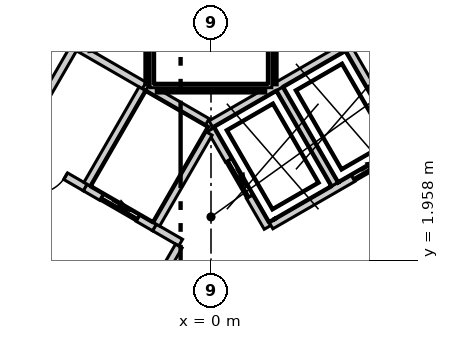
"""IFC4 building model, lengths in metres.
Left out: names, types, materials, properties, quantities, classifications, styles, units other than length and angle.
Written with IfcOpenShell. Run it as: python <this file> out.ifc"""

import sys

from ifc_helpers import new_model, si_unit, direction, frame, frame_2d, origin, place, context, subcontext, project, spatial, polyline, rectangle, outline, extrude, element, fill, save


model = new_model("IFC4")
c1 = context("Model", 3, precision=1e-05, world=origin(), true_north=direction((0.0, 1.0)))
c2 = subcontext(c1, "Body", "Model", "MODEL_VIEW")
j1 = project(units=[si_unit("LENGTHUNIT", "METRE"), si_unit("PLANEANGLEUNIT", "RADIAN")], contexts=[c1])
p1 = place(None, origin())
s1 = spatial("IfcSite", under=j1, at=p1, CompositionType="ELEMENT")
p2 = place(p1, origin())
s2 = spatial("IfcBuilding", under=s1, at=p2, CompositionType="ELEMENT")
p3 = place(p2, frame((0.0, 0.0, 47.3)))
s3 = spatial("IfcBuildingStorey", under=s2, at=p3, CompositionType="ELEMENT", Elevation=47.3)
p4 = place(p3, frame((-1.645, 15.25, -0.3), z_axis=(0.0, 0.0, 1.0), x_axis=(-0.500026485275, -0.866010111964, 0.0)))
e1 = element("IfcWall", 1, at=p4, inside=s3, PredefinedType="SHEAR", context=c2, shape_type="SweptSolid", body=[
    extrude(outline(polyline([(-0.26, -0.45), (1.685, -0.45), (3.63, -0.45), (5.576, -0.45), (7.521, -0.45), (9.466, -0.449), (11.411, -0.449), (13.357, -0.449), (15.302, -0.449), (17.247, -0.449), (19.192, -0.449), (21.138, -0.449), (23.083, -0.449), (25.028, -0.449), (24.509, 0.45), (22.644, 0.45), (20.778, 0.45), (18.913, 0.45), (17.048, 0.45), (15.182, 0.449), (13.317, 0.449), (11.452, 0.449), (9.587, 0.449), (7.721, 0.449), (5.856, 0.449), (3.991, 0.449), (2.125, 0.449), (0.26, 0.449), (-0.26, -0.45)])), origin(), (0.0, 0.0, 1.0), 4.0),
])
p5 = place(p4, frame((11.834, 0.0, 0.3)))
e2 = element("IfcOpeningElement", 2, at=p5, cuts=e1, PredefinedType="OPENING", context=c2, shape_type="SweptSolid", body=[
    extrude(rectangle(XDim=1.1, YDim=2.1, at=frame_2d((0.55, 1.05))), frame((0.0, 0.46, 0.0), z_axis=(0.0, -1.0, 0.0), x_axis=(1.0, 0.0, 0.0)), (0.0, 0.0, 1.0), 0.92),
])
p6 = place(p4, frame((6.671, 0.0, 0.3)))
e3 = element("IfcOpeningElement", 3, at=p6, cuts=e1, PredefinedType="OPENING", context=c2, shape_type="SweptSolid", body=[
    extrude(rectangle(XDim=1.0, YDim=2.1, at=frame_2d((0.5, 1.05))), frame((0.0, 0.46, 0.0), z_axis=(0.0, -1.0, 0.0), x_axis=(1.0, 0.0, 0.0)), (0.0, 0.0, 1.0), 0.92),
])
p7 = place(p3, frame((14.03, -6.2, -0.3), z_axis=(0.0, 0.0, 1.0), x_axis=(-0.500026485275, 0.866010111964, 0.0)))
e4 = element("IfcWall", 4, at=p7, inside=s3, PredefinedType="SHEAR", context=c2, shape_type="SweptSolid", body=[
    extrude(outline(polyline([(-0.26, -0.449), (1.685, -0.449), (3.63, -0.449), (5.576, -0.449), (7.521, -0.449), (9.466, -0.449), (11.411, -0.449), (13.357, -0.449), (15.302, -0.449), (17.247, -0.45), (19.192, -0.45), (21.138, -0.45), (23.083, -0.45), (25.028, -0.45), (24.509, 0.449), (22.644, 0.449), (20.778, 0.449), (18.913, 0.449), (17.048, 0.449), (15.182, 0.449), (13.317, 0.449), (11.452, 0.449), (9.587, 0.449), (7.721, 0.45), (5.856, 0.45), (3.991, 0.45), (2.125, 0.45), (0.26, 0.45), (-0.26, -0.449)])), origin(), (0.0, 0.0, 1.0), 4.0),
])
p8 = place(p7, frame((11.484, 0.0, 0.3)))
e5 = element("IfcOpeningElement", 5, at=p8, cuts=e4, PredefinedType="OPENING", context=c2, shape_type="SweptSolid", body=[
    extrude(rectangle(XDim=1.8, YDim=2.1, at=frame_2d((0.9, 1.05))), frame((0.0, 0.46, 0.0), z_axis=(0.0, -1.0, 0.0), x_axis=(1.0, 0.0, 0.0)), (0.0, 0.0, 1.0), 0.92),
])
p9 = place(p7, frame((18.976, 0.0, 0.3)))
e6 = element("IfcOpeningElement", 6, at=p9, cuts=e4, PredefinedType="OPENING", context=c2, shape_type="SweptSolid", body=[
    extrude(rectangle(XDim=0.9, YDim=2.1, at=frame_2d((0.45, 1.05))), frame((0.0, 0.46, 0.0), z_axis=(0.0, -1.0, 0.0), x_axis=(1.0, 0.0, 0.0)), (0.0, 0.0, 1.0), 0.92),
])
p10 = place(p3, frame((-3.417, 38.096, 0.0), z_axis=(0.0, 0.0, 1.0), x_axis=(-0.500000412988, -0.866025165346, 0.0)))
e7 = element("IfcWall", 7, at=p10, inside=s3, PredefinedType="ELEMENTEDWALL", context=c2, shape_type="SweptSolid", body=[
    extrude(rectangle(XDim=62.548, YDim=0.2, at=frame_2d((31.274, 0.0))), origin(), (0.0, 0.0, 1.0), 3.7),
])
p11 = place(p10, frame((2.25, 0.0, 0.9)))
e8 = element("IfcOpeningElement", 8, at=p11, cuts=e7, PredefinedType="OPENING", context=c2, shape_type="SweptSolid", body=[
    extrude(rectangle(XDim=5.6, YDim=2.5, at=frame_2d((2.8, 1.25))), frame((0.0, 0.11, 0.0), z_axis=(0.0, -1.0, 0.0), x_axis=(1.0, 0.0, 0.0)), (0.0, 0.0, 1.0), 0.22),
])
p12 = place(p10, frame((9.745, 0.0, 0.9)))
e9 = element("IfcOpeningElement", 9, at=p12, cuts=e7, PredefinedType="OPENING", context=c2, shape_type="SweptSolid", body=[
    extrude(rectangle(XDim=5.6, YDim=2.5, at=frame_2d((2.8, 1.25))), frame((0.0, 0.11, 0.0), z_axis=(0.0, -1.0, 0.0), x_axis=(1.0, 0.0, 0.0)), (0.0, 0.0, 1.0), 0.22),
])
p13 = place(p10, frame((17.241, 0.0, 0.9)))
e10 = element("IfcOpeningElement", 10, at=p13, cuts=e7, PredefinedType="OPENING", context=c2, shape_type="SweptSolid", body=[
    extrude(rectangle(XDim=5.6, YDim=2.5, at=frame_2d((2.8, 1.25))), frame((0.0, 0.11, 0.0), z_axis=(0.0, -1.0, 0.0), x_axis=(1.0, 0.0, 0.0)), (0.0, 0.0, 1.0), 0.22),
])
p14 = place(p10, frame((24.736, 0.0, 0.9)))
e11 = element("IfcOpeningElement", 11, at=p14, cuts=e7, PredefinedType="OPENING", context=c2, shape_type="SweptSolid", body=[
    extrude(rectangle(XDim=5.6, YDim=2.5, at=frame_2d((2.8, 1.25))), frame((0.0, 0.11, 0.0), z_axis=(0.0, -1.0, 0.0), x_axis=(1.0, 0.0, 0.0)), (0.0, 0.0, 1.0), 0.22),
])
p15 = place(p10, frame((32.231, 0.0, 0.9)))
e12 = element("IfcOpeningElement", 12, at=p15, cuts=e7, PredefinedType="OPENING", context=c2, shape_type="SweptSolid", body=[
    extrude(rectangle(XDim=5.6, YDim=2.5, at=frame_2d((2.8, 1.25))), frame((0.0, 0.11, 0.0), z_axis=(0.0, -1.0, 0.0), x_axis=(1.0, 0.0, 0.0)), (0.0, 0.0, 1.0), 0.22),
])
p16 = place(p10, frame((39.727, 0.0, 0.9)))
e13 = element("IfcOpeningElement", 13, at=p16, cuts=e7, PredefinedType="OPENING", context=c2, shape_type="SweptSolid", body=[
    extrude(rectangle(XDim=5.6, YDim=2.5, at=frame_2d((2.8, 1.25))), frame((0.0, 0.11, 0.0), z_axis=(0.0, -1.0, 0.0), x_axis=(1.0, 0.0, 0.0)), (0.0, 0.0, 1.0), 0.22),
])
p17 = place(p10, frame((47.222, 0.0, 0.9)))
e14 = element("IfcOpeningElement", 14, at=p17, cuts=e7, PredefinedType="OPENING", context=c2, shape_type="SweptSolid", body=[
    extrude(rectangle(XDim=5.6, YDim=2.5, at=frame_2d((2.8, 1.25))), frame((0.0, 0.11, 0.0), z_axis=(0.0, -1.0, 0.0), x_axis=(1.0, 0.0, 0.0)), (0.0, 0.0, 1.0), 0.22),
])
p18 = place(p10, frame((54.717, 0.0, 0.9)))
e15 = element("IfcOpeningElement", 15, at=p18, cuts=e7, PredefinedType="OPENING", context=c2, shape_type="SweptSolid", body=[
    extrude(rectangle(XDim=5.6, YDim=2.5, at=frame_2d((2.8, 1.25))), frame((0.0, 0.11, 0.0), z_axis=(0.0, -1.0, 0.0), x_axis=(1.0, 0.0, 0.0)), (0.0, 0.0, 1.0), 0.22),
])
p19 = place(p3, frame((34.701, -16.089, 0.0), z_axis=(0.0, 0.0, 1.0), x_axis=(-0.499998722828, 0.866026141159, 0.0)))
e16 = element("IfcWall", 16, at=p19, inside=s3, PredefinedType="ELEMENTEDWALL", context=c2, shape_type="SweptSolid", body=[
    extrude(rectangle(XDim=62.548, YDim=0.2, at=frame_2d((31.274, 0.0))), origin(), (0.0, 0.0, 1.0), 3.7),
])
p20 = place(p19, frame((2.25, 0.0, 0.9)))
e17 = element("IfcOpeningElement", 17, at=p20, cuts=e16, PredefinedType="OPENING", context=c2, shape_type="SweptSolid", body=[
    extrude(rectangle(XDim=5.6, YDim=2.5, at=frame_2d((2.8, 1.25))), frame((0.0, 0.11, 0.0), z_axis=(0.0, -1.0, 0.0), x_axis=(1.0, 0.0, 0.0)), (0.0, 0.0, 1.0), 0.22),
])
p21 = place(p19, frame((9.746, 0.0, 0.9)))
e18 = element("IfcOpeningElement", 18, at=p21, cuts=e16, PredefinedType="OPENING", context=c2, shape_type="SweptSolid", body=[
    extrude(rectangle(XDim=5.6, YDim=2.5, at=frame_2d((2.8, 1.25))), frame((0.0, 0.11, 0.0), z_axis=(0.0, -1.0, 0.0), x_axis=(1.0, 0.0, 0.0)), (0.0, 0.0, 1.0), 0.22),
])
p22 = place(p19, frame((17.241, 0.0, 0.9)))
e19 = element("IfcOpeningElement", 19, at=p22, cuts=e16, PredefinedType="OPENING", context=c2, shape_type="SweptSolid", body=[
    extrude(rectangle(XDim=5.6, YDim=2.5, at=frame_2d((2.8, 1.25))), frame((0.0, 0.11, 0.0), z_axis=(0.0, -1.0, 0.0), x_axis=(1.0, 0.0, 0.0)), (0.0, 0.0, 1.0), 0.22),
])
p23 = place(p19, frame((24.736, 0.0, 0.9)))
e20 = element("IfcOpeningElement", 20, at=p23, cuts=e16, PredefinedType="OPENING", context=c2, shape_type="SweptSolid", body=[
    extrude(rectangle(XDim=5.6, YDim=2.5, at=frame_2d((2.8, 1.25))), frame((0.0, 0.11, 0.0), z_axis=(0.0, -1.0, 0.0), x_axis=(1.0, 0.0, 0.0)), (0.0, 0.0, 1.0), 0.22),
])
p24 = place(p19, frame((32.232, 0.0, 0.9)))
e21 = element("IfcOpeningElement", 21, at=p24, cuts=e16, PredefinedType="OPENING", context=c2, shape_type="SweptSolid", body=[
    extrude(rectangle(XDim=5.6, YDim=2.5, at=frame_2d((2.8, 1.25))), frame((0.0, 0.11, 0.0), z_axis=(0.0, -1.0, 0.0), x_axis=(1.0, 0.0, 0.0)), (0.0, 0.0, 1.0), 0.22),
])
p25 = place(p19, frame((39.727, 0.0, 0.9)))
e22 = element("IfcOpeningElement", 22, at=p25, cuts=e16, PredefinedType="OPENING", context=c2, shape_type="SweptSolid", body=[
    extrude(rectangle(XDim=5.6, YDim=2.5, at=frame_2d((2.8, 1.25))), frame((0.0, 0.11, 0.0), z_axis=(0.0, -1.0, 0.0), x_axis=(1.0, 0.0, 0.0)), (0.0, 0.0, 1.0), 0.22),
])
p26 = place(p19, frame((47.222, 0.0, 0.9)))
e23 = element("IfcOpeningElement", 23, at=p26, cuts=e16, PredefinedType="OPENING", context=c2, shape_type="SweptSolid", body=[
    extrude(rectangle(XDim=5.6, YDim=2.5, at=frame_2d((2.8, 1.25))), frame((0.0, 0.11, 0.0), z_axis=(0.0, -1.0, 0.0), x_axis=(1.0, 0.0, 0.0)), (0.0, 0.0, 1.0), 0.22),
])
p27 = place(p19, frame((54.717, 0.0, 0.9)))
e24 = element("IfcOpeningElement", 24, at=p27, cuts=e16, PredefinedType="OPENING", context=c2, shape_type="SweptSolid", body=[
    extrude(rectangle(XDim=5.6, YDim=2.5, at=frame_2d((2.8, 1.25))), frame((0.0, 0.11, 0.0), z_axis=(0.0, -1.0, 0.0), x_axis=(1.0, 0.0, 0.0)), (0.0, 0.0, 1.0), 0.22),
])
p28 = place(p3, frame((-19.497, -11.17, 0.0), z_axis=(0.0, 0.0, 1.0), x_axis=(0.499998854553, 0.866026065108, 0.0)))
e25 = element("IfcWall", 25, at=p28, inside=s3, PredefinedType="PARTITIONING", context=c2, shape_type="SweptSolid", body=[
    extrude(rectangle(XDim=38.994, YDim=0.15, at=frame_2d((19.497, 0.0))), origin(), (0.0, 0.0, 1.0), 3.7),
])
p29 = place(p28, frame((36.144, 0.0, 0.0)))
e26 = element("IfcOpeningElement", 26, at=p29, cuts=e25, PredefinedType="OPENING", context=c2, shape_type="SweptSolid", body=[
    extrude(rectangle(XDim=1.1, YDim=2.1, at=frame_2d((0.55, 1.05))), frame((0.0, 0.085, 0.0), z_axis=(0.0, -1.0, 0.0), x_axis=(1.0, 0.0, 0.0)), (0.0, 0.0, 1.0), 0.17),
])
p30 = place(p28, frame((21.963, 0.0, 0.0)))
e27 = element("IfcOpeningElement", 27, at=p30, cuts=e25, PredefinedType="OPENING", context=c2, shape_type="SweptSolid", body=[
    extrude(rectangle(XDim=1.1, YDim=2.1, at=frame_2d((0.55, 1.05))), frame((0.0, 0.085, 0.0), z_axis=(0.0, -1.0, 0.0), x_axis=(1.0, 0.0, 0.0)), (0.0, 0.0, 1.0), 0.17),
])
p31 = place(p28, frame((32.363, 0.0, 0.0)))
e28 = element("IfcOpeningElement", 28, at=p31, cuts=e25, PredefinedType="OPENING", context=c2, shape_type="SweptSolid", body=[
    extrude(rectangle(XDim=0.9, YDim=2.1, at=frame_2d((0.45, 1.05))), frame((0.0, 0.085, 0.0), z_axis=(0.0, -1.0, 0.0), x_axis=(1.0, 0.0, 0.0)), (0.0, 0.0, 1.0), 0.17),
])
p32 = place(p28, frame((29.163, 0.0, 0.0)))
e29 = element("IfcOpeningElement", 29, at=p32, cuts=e25, PredefinedType="OPENING", context=c2, shape_type="SweptSolid", body=[
    extrude(rectangle(XDim=0.9, YDim=2.1, at=frame_2d((0.45, 1.05))), frame((0.0, 0.085, 0.0), z_axis=(0.0, -1.0, 0.0), x_axis=(1.0, 0.0, 0.0)), (0.0, 0.0, 1.0), 0.17),
])
p33 = place(p28, frame((26.263, 0.0, 0.0)))
e30 = element("IfcOpeningElement", 30, at=p33, cuts=e25, PredefinedType="OPENING", context=c2, shape_type="SweptSolid", body=[
    extrude(rectangle(XDim=1.0, YDim=2.1, at=frame_2d((0.5, 1.05))), frame((0.0, 0.085, 0.0), z_axis=(0.0, -1.0, 0.0), x_axis=(1.0, 0.0, 0.0)), (0.0, 0.0, 1.0), 0.17),
])
p34 = place(p28, frame((11.373, 0.0, 0.0)))
e31 = element("IfcOpeningElement", 31, at=p34, cuts=e25, PredefinedType="OPENING", context=c2, shape_type="SweptSolid", body=[
    extrude(rectangle(XDim=1.1, YDim=2.1, at=frame_2d((0.55, 1.05))), frame((0.0, 0.085, 0.0), z_axis=(0.0, -1.0, 0.0), x_axis=(1.0, 0.0, 0.0)), (0.0, 0.0, 1.0), 0.17),
])
p35 = place(p28, frame((1.581, 0.0, 0.0)))
e32 = element("IfcOpeningElement", 32, at=p35, cuts=e25, PredefinedType="OPENING", context=c2, shape_type="SweptSolid", body=[
    extrude(rectangle(XDim=1.1, YDim=2.1, at=frame_2d((0.55, 1.05))), frame((0.0, 0.085, 0.0), z_axis=(0.0, -1.0, 0.0), x_axis=(1.0, 0.0, 0.0)), (0.0, 0.0, 1.0), 0.17),
])
p36 = place(p3, frame((0.075, 22.47, 0.0), z_axis=(0.0, 0.0, 1.0), x_axis=(0.500002280369, -0.866024087209, 0.0)))
e33 = element("IfcWall", 33, at=p36, inside=s3, PredefinedType="PARTITIONING", context=c2, shape_type="SweptSolid", body=[
    extrude(rectangle(XDim=38.844, YDim=0.15, at=frame_2d((19.422, 0.0))), origin(), (0.0, 0.0, 1.0), 3.7),
])
p37 = place(p36, frame((36.244, 0.0, 0.0)))
e34 = element("IfcOpeningElement", 34, at=p37, cuts=e33, PredefinedType="OPENING", context=c2, shape_type="SweptSolid", body=[
    extrude(rectangle(XDim=1.0, YDim=2.1, at=frame_2d((0.5, 1.05))), frame((0.0, 0.085, 0.0), z_axis=(0.0, -1.0, 0.0), x_axis=(1.0, 0.0, 0.0)), (0.0, 0.0, 1.0), 0.17),
])
p38 = place(p36, frame((21.963, 0.0, 0.0)))
e35 = element("IfcOpeningElement", 35, at=p38, cuts=e33, PredefinedType="OPENING", context=c2, shape_type="SweptSolid", body=[
    extrude(rectangle(XDim=1.1, YDim=2.1, at=frame_2d((0.55, 1.05))), frame((0.0, 0.085, 0.0), z_axis=(0.0, -1.0, 0.0), x_axis=(1.0, 0.0, 0.0)), (0.0, 0.0, 1.0), 0.17),
])
p39 = place(p36, frame((32.363, 0.0, 0.0)))
e36 = element("IfcOpeningElement", 36, at=p39, cuts=e33, PredefinedType="OPENING", context=c2, shape_type="SweptSolid", body=[
    extrude(rectangle(XDim=0.9, YDim=2.1, at=frame_2d((0.45, 1.05))), frame((0.0, 0.085, 0.0), z_axis=(0.0, -1.0, 0.0), x_axis=(1.0, 0.0, 0.0)), (0.0, 0.0, 1.0), 0.17),
])
p40 = place(p36, frame((29.163, 0.0, 0.0)))
e37 = element("IfcOpeningElement", 37, at=p40, cuts=e33, PredefinedType="OPENING", context=c2, shape_type="SweptSolid", body=[
    extrude(rectangle(XDim=0.9, YDim=2.1, at=frame_2d((0.45, 1.05))), frame((0.0, 0.085, 0.0), z_axis=(0.0, -1.0, 0.0), x_axis=(1.0, 0.0, 0.0)), (0.0, 0.0, 1.0), 0.17),
])
p41 = place(p36, frame((26.263, 0.0, 0.0)))
e38 = element("IfcOpeningElement", 38, at=p41, cuts=e33, PredefinedType="OPENING", context=c2, shape_type="SweptSolid", body=[
    extrude(rectangle(XDim=1.0, YDim=2.1, at=frame_2d((0.5, 1.05))), frame((0.0, 0.085, 0.0), z_axis=(0.0, -1.0, 0.0), x_axis=(1.0, 0.0, 0.0)), (0.0, 0.0, 1.0), 0.17),
])
p42 = place(p36, frame((9.071, 0.0, 0.0)))
e39 = element("IfcOpeningElement", 39, at=p42, cuts=e33, PredefinedType="OPENING", context=c2, shape_type="SweptSolid", body=[
    extrude(rectangle(XDim=1.1, YDim=2.1, at=frame_2d((0.55, 1.05))), frame((0.0, 0.085, 0.0), z_axis=(0.0, -1.0, 0.0), x_axis=(1.0, 0.0, 0.0)), (0.0, 0.0, 1.0), 0.17),
])
p43 = place(p3, frame((-0.002, 5.541, 0.0), z_axis=(0.0, 0.0, 1.0), x_axis=(0.86600155993, 0.500041296494, 0.0)))
e40 = element("IfcWall", 40, at=p43, inside=s3, PredefinedType="SOLIDWALL", context=c2, shape_type="SweptSolid", body=[
    extrude(rectangle(XDim=4.132, YDim=0.2, at=frame_2d((2.066, 0.0))), origin(), (0.0, 0.0, 1.0), 3.7),
])
p44 = place(p3, frame((0.0, 5.4, 0.0), z_axis=(0.0, 0.0, 1.0), x_axis=(0.500103862429, -0.865965430478, 0.0)))
e41 = element("IfcWall", 41, at=p44, inside=s3, PredefinedType="SOLIDWALL", context=c2, shape_type="SweptSolid", body=[
    extrude(rectangle(XDim=2.973, YDim=0.2, at=frame_2d((1.487, 0.0))), origin(), (0.0, 0.0, 1.0), 3.7),
])
p45 = place(p44, frame((0.937, 0.0, 0.0)))
e42 = element("IfcOpeningElement", 42, at=p45, cuts=e41, PredefinedType="OPENING", context=c2, shape_type="SweptSolid", body=[
    extrude(rectangle(XDim=1.1, YDim=2.1, at=frame_2d((0.55, 1.05))), frame((0.0, 0.11, 0.0), z_axis=(0.0, -1.0, 0.0), x_axis=(1.0, 0.0, 0.0)), (0.0, 0.0, 1.0), 0.22),
])
p46 = place(p3, frame((1.578, 2.874, 0.0), z_axis=(0.0, 0.0, 1.0), x_axis=(0.866031483044, 0.499989470266, 0.0)))
e43 = element("IfcWall", 43, at=p46, inside=s3, PredefinedType="SOLIDWALL", context=c2, shape_type="SweptSolid", body=[
    extrude(rectangle(XDim=6.226, YDim=0.2, at=frame_2d((3.113, 0.0))), origin(), (0.0, 0.0, 1.0), 3.7),
])
p47 = place(p46, frame((2.496, 0.0, 0.0)))
e44 = element("IfcOpeningElement", 44, at=p47, cuts=e43, PredefinedType="OPENING", context=c2, shape_type="SweptSolid", body=[
    extrude(rectangle(XDim=1.1, YDim=2.1, at=frame_2d((0.55, 1.05))), frame((0.0, 0.11, 0.0), z_axis=(0.0, -1.0, 0.0), x_axis=(1.0, 0.0, 0.0)), (0.0, 0.0, 1.0), 0.22),
])
p48 = place(p3, frame((3.278, -0.071, 0.0), z_axis=(0.0, 0.0, 1.0), x_axis=(0.865953757655, 0.500124074208, 0.0)))
e45 = element("IfcWall", 45, at=p48, inside=s3, PredefinedType="SOLIDWALL", context=c2, shape_type="SweptSolid", body=[
    extrude(rectangle(XDim=6.227, YDim=0.2, at=frame_2d((3.113, 0.0))), origin(), (0.0, 0.0, 1.0), 3.7),
])
for number, where, z_axis, x_axis in (
    (46, (3.626, 7.52, 0.0), (0.0, 0.0, 1.0), (0.5, -0.866, 0.0)),
    (47, (1.807, 6.47, 0.0), (0.0, 0.0, 1.0), (0.5, -0.866, 0.0)),
):
    element("IfcWall", number, at=place(p3, frame(where, z_axis=z_axis, x_axis=x_axis)), inside=s3, PredefinedType="SOLIDWALL", context=c2, shape_type="SweptSolid", body=[
        extrude(rectangle(XDim=2.9, YDim=0.2, at=frame_2d((1.45, 0.0))), origin(), (0.0, 0.0, 1.0), 3.7),
    ])
p49 = place(p3, frame((-6.97, 5.987, 0.0), z_axis=(0.0, 0.0, 1.0), x_axis=(0.866029956157, -0.499992114976, 0.0)))
e48 = element("IfcWall", 48, at=p49, inside=s3, PredefinedType="SOLIDWALL", context=c2, shape_type="SweptSolid", body=[
    extrude(rectangle(XDim=4.232, YDim=0.2, at=frame_2d((2.116, 0.0))), origin(), (0.0, 0.0, 1.0), 3.7),
])
p50 = place(p49, frame((2.73, 0.0, 0.0)))
e49 = element("IfcOpeningElement", 49, at=p50, cuts=e48, PredefinedType="OPENING", context=c2, shape_type="SweptSolid", body=[
    extrude(rectangle(XDim=0.9, YDim=2.1, at=frame_2d((0.45, 1.05))), frame((0.0, 0.11, 0.0), z_axis=(0.0, -1.0, 0.0), x_axis=(1.0, 0.0, 0.0)), (0.0, 0.0, 1.0), 0.22),
])
p51 = place(p3, frame((-1.488, 2.822, 0.0), z_axis=(0.0, 0.0, 1.0), x_axis=(0.866236612152, -0.499633997809, 0.0)))
e50 = element("IfcWall", 50, at=p51, inside=s3, PredefinedType="SOLIDWALL", context=c2, shape_type="SweptSolid", body=[
    extrude(rectangle(XDim=0.796, YDim=0.2, at=frame_2d((0.398, 0.0))), origin(), (0.0, 0.0, 1.0), 3.7),
])
p52 = place(p3, frame((-5.076, 5.009, 0.0), z_axis=(0.0, 0.0, 1.0), x_axis=(0.50002537861, 0.866010750942, 0.0)))
e51 = element("IfcWall", 51, at=p52, inside=s3, PredefinedType="SOLIDWALL", context=c2, shape_type="SweptSolid", body=[
    extrude(rectangle(XDim=3.0, YDim=0.2, at=frame_2d((1.5, 0.0))), origin(), (0.0, 0.0, 1.0), 3.7),
])
p53 = place(p3, frame((-3.489, 7.557, 0.0), z_axis=(0.0, 0.0, 1.0), x_axis=(0.866010750942, -0.50002537861, 0.0)))
e52 = element("IfcWall", 52, at=p53, inside=s3, PredefinedType="SOLIDWALL", context=c2, shape_type="SweptSolid", body=[
    extrude(rectangle(XDim=2.0, YDim=0.2, at=frame_2d((1.0, 0.0))), origin(), (0.0, 0.0, 1.0), 3.7),
])
p54 = place(p3, frame((-2.444, -0.433, 0.0), z_axis=(0.0, 0.0, 1.0), x_axis=(0.500035624827, 0.866004834804, 0.0)))
e53 = element("IfcWall", 53, at=p54, inside=s3, PredefinedType="SOLIDWALL", context=c2, shape_type="SweptSolid", body=[
    extrude(rectangle(XDim=3.194, YDim=0.2, at=frame_2d((1.597, 0.0))), origin(), (0.0, 0.0, 1.0), 3.7),
])
p55 = place(p3, frame((-3.309, 3.873, 0.0), z_axis=(0.0, 0.0, 1.0), x_axis=(0.866098583652, -0.499873227325, 0.0)))
e54 = element("IfcWall", 54, at=p55, inside=s3, PredefinedType="SOLIDWALL", context=c2, shape_type="SweptSolid", body=[
    extrude(rectangle(XDim=2.103, YDim=0.2, at=frame_2d((1.051, 0.0))), origin(), (0.0, 0.0, 1.0), 3.7),
])
p56 = place(p55, frame((0.502, 0.0, 0.0)))
e55 = element("IfcOpeningElement", 55, at=p56, cuts=e54, PredefinedType="OPENING", context=c2, shape_type="SweptSolid", body=[
    extrude(rectangle(XDim=1.1, YDim=2.1, at=frame_2d((0.55, 1.05))), frame((0.0, 0.11, 0.0), z_axis=(0.0, -1.0, 0.0), x_axis=(1.0, 0.0, 0.0)), (0.0, 0.0, 1.0), 0.22),
])
p57 = place(p3, frame((-3.257, 3.959, 0.0), z_axis=(0.0, 0.0, 1.0), x_axis=(0.50012328804, 0.865954211699, 0.0)))
e56 = element("IfcWall", 56, at=p57, inside=s3, PredefinedType="SOLIDWALL", context=c2, shape_type="SweptSolid", body=[
    extrude(rectangle(XDim=2.9, YDim=0.2, at=frame_2d((1.45, 0.0))), origin(), (0.0, 0.0, 1.0), 3.7),
])
p58 = place(p3, frame((-1.67, 6.507, 0.0), z_axis=(0.0, 0.0, 1.0), x_axis=(0.865941441609, -0.500145398563, 0.0)))
e57 = element("IfcWall", 57, at=p58, inside=s3, PredefinedType="SOLIDWALL", context=c2, shape_type="SweptSolid", body=[
    extrude(rectangle(XDim=1.815, YDim=0.2, at=frame_2d((0.908, 0.0))), origin(), (0.0, 0.0, 1.0), 3.7),
])
p59 = place(p3, frame((-1.438, 2.909, 0.0), z_axis=(0.0, 0.0, 1.0), x_axis=(0.499829630636, 0.866123744241, 0.0)))
e58 = element("IfcWall", 58, at=p59, inside=s3, PredefinedType="SOLIDWALL", context=c2, shape_type="SweptSolid", body=[
    extrude(rectangle(XDim=2.761, YDim=0.2, at=frame_2d((1.38, 0.0))), origin(), (0.0, 0.0, 1.0), 3.7),
])
p60 = place(p3, frame((1.6, 6.615, 0.0), z_axis=(0.0, 0.0, 1.0), x_axis=(0.0, 1.0, 0.0)))
e59 = element("IfcWall", 59, at=p60, inside=s3, PredefinedType="SOLIDWALL", context=c2, shape_type="SweptSolid", body=[
    extrude(rectangle(XDim=8.615, YDim=0.2, at=frame_2d((4.308, 0.0))), origin(), (0.0, 0.0, 1.0), 3.7),
])
p61 = place(p3, frame((-1.4, 6.5, 0.0), z_axis=(0.0, 0.0, 1.0), x_axis=(1.0, 0.0, 0.0)))
e60 = element("IfcWall", 60, at=p61, inside=s3, PredefinedType="SOLIDWALL", context=c2, shape_type="SweptSolid", body=[
    extrude(rectangle(XDim=2.8, YDim=0.2, at=frame_2d((1.4, 0.0))), origin(), (0.0, 0.0, 1.0), 3.7),
])
p62 = place(p3, frame((-1.6, 6.615, 0.0), z_axis=(0.0, 0.0, 1.0), x_axis=(0.0, 1.0, 0.0)))
e61 = element("IfcWall", 61, at=p62, inside=s3, PredefinedType="SOLIDWALL", context=c2, shape_type="SweptSolid", body=[
    extrude(rectangle(XDim=8.615, YDim=0.2, at=frame_2d((4.308, 0.0))), origin(), (0.0, 0.0, 1.0), 3.7),
])
p63 = place(p45, origin())
e62 = element("IfcDoor", 62, at=p63, inside=s3, OperationType="SLIDING_TO_LEFT", PredefinedType="DOOR", context=c2, shape_type="SweptSolid", body=[
    extrude(rectangle(XDim=1.1, YDim=2.1, at=frame_2d((0.55, 1.05))), frame((0.0, 0.025, 0.0), z_axis=(0.0, -1.0, 0.0), x_axis=(1.0, 0.0, 0.0)), (0.0, 0.0, 1.0), 0.05),
])
fill(e42, e62)
p64 = place(p47, origin())
e63 = element("IfcDoor", 63, at=p64, inside=s3, OperationType="SLIDING_TO_LEFT", PredefinedType="DOOR", context=c2, shape_type="SweptSolid", body=[
    extrude(rectangle(XDim=1.1, YDim=2.1, at=frame_2d((0.55, 1.05))), frame((0.0, 0.025, 0.0), z_axis=(0.0, -1.0, 0.0), x_axis=(1.0, 0.0, 0.0)), (0.0, 0.0, 1.0), 0.05),
])
fill(e44, e63)
p65 = place(p56, origin())
e64 = element("IfcDoor", 64, at=p65, inside=s3, OperationType="SLIDING_TO_LEFT", PredefinedType="DOOR", context=c2, shape_type="SweptSolid", body=[
    extrude(rectangle(XDim=1.1, YDim=2.1, at=frame_2d((0.55, 1.05))), frame((0.0, 0.025, 0.0), z_axis=(0.0, -1.0, 0.0), x_axis=(1.0, 0.0, 0.0)), (0.0, 0.0, 1.0), 0.05),
])
fill(e55, e64)
p66 = place(p50, origin())
e65 = element("IfcDoor", 65, at=p66, inside=s3, OperationType="SINGLE_SWING_LEFT", PredefinedType="DOOR", context=c2, shape_type="SweptSolid", body=[
    extrude(rectangle(XDim=0.9, YDim=2.1, at=frame_2d((0.45, 1.05))), frame((0.0, 0.025, 0.0), z_axis=(0.0, -1.0, 0.0), x_axis=(1.0, 0.0, 0.0)), (0.0, 0.0, 1.0), 0.05),
])
fill(e49, e65)
save(model, sys.argv[1])
